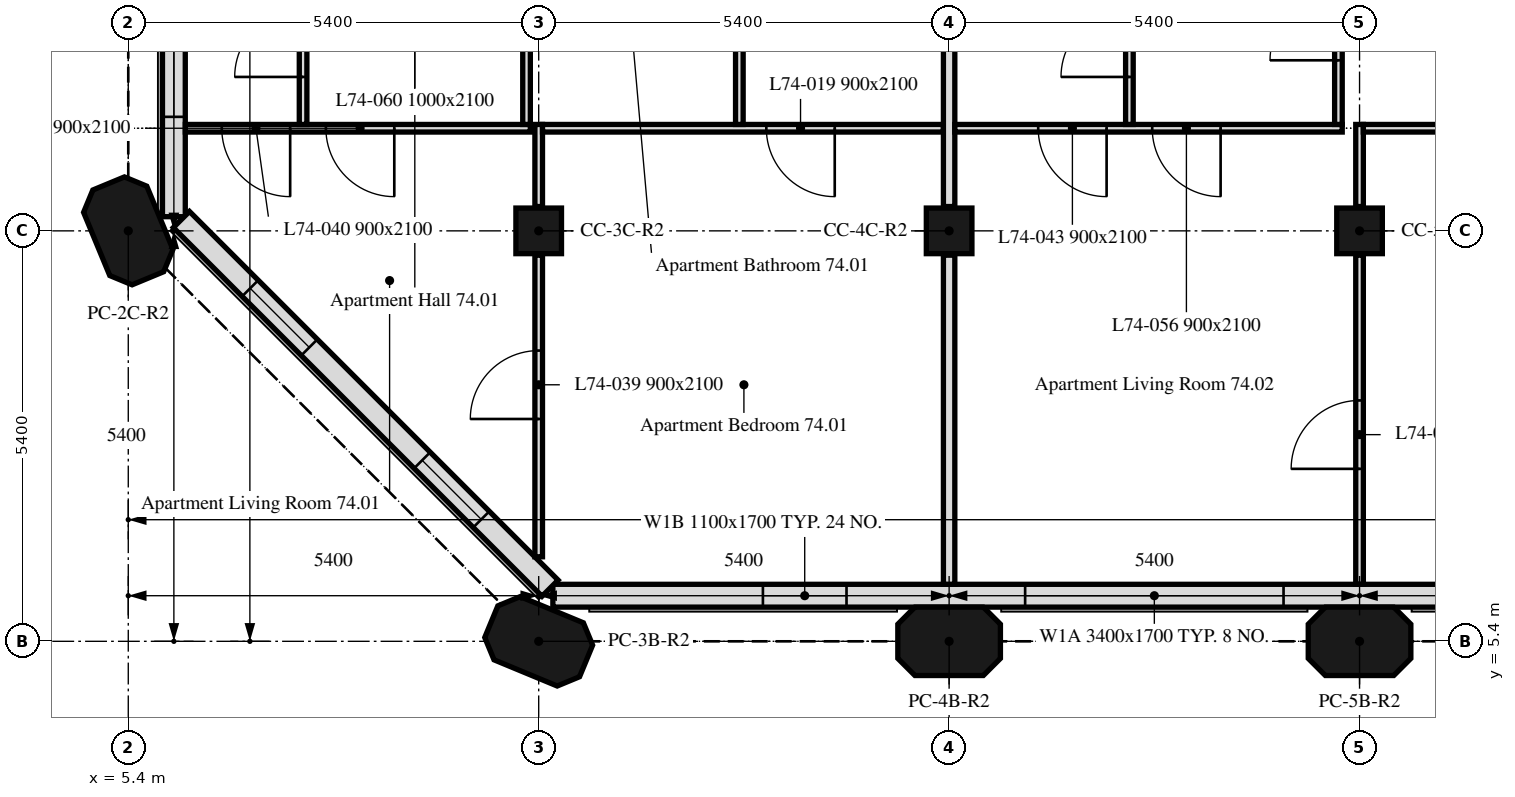
"""IFC4 building model, lengths in metres.
Left out: names, types, materials, properties, quantities, classifications, styles, units other than length and angle.
Written with IfcOpenShell. Run it as: python <this file> out.ifc"""

import sys

from ifc_helpers import new_model, si_unit, direction, frame, frame_2d, origin, origin_2d, place, context, subcontext, project, spatial, polyline, rectangle, outline, extrude, element, fill, save


model = new_model("IFC4")
c1 = context("Model", 3, precision=1e-05, world=origin(), true_north=direction((0.0, 1.0)))
c2 = subcontext(c1, "Body", "Model", "MODEL_VIEW")
j1 = project(units=[si_unit("LENGTHUNIT", "METRE"), si_unit("PLANEANGLEUNIT", "RADIAN")], contexts=[c1])
p1 = place(None, origin())
s1 = spatial("IfcSite", under=j1, at=p1, CompositionType="ELEMENT")
p2 = place(p1, origin())
s2 = spatial("IfcBuilding", under=s1, at=p2, CompositionType="ELEMENT")
p3 = place(p2, frame((0.0, 0.0, 298.3)))
s3 = spatial("IfcBuildingStorey", under=s2, at=p3, CompositionType="ELEMENT", Elevation=298.3)
for number, where, z_axis, x_axis in (
    (1, (10.8, 5.4, 0.0), (0.0, 0.0, 1.0), (-0.924, 0.383, 0.0)),
    (2, (16.2, 5.4, 0.0), (0.0, 0.0, 1.0), (1.0, 0.0, 0.0)),
    (3, (21.6, 5.4, 0.0), (0.0, 0.0, 1.0), (1.0, 0.0, 0.0)),
    (4, (5.4, 10.8, 0.0), (0.0, 0.0, 1.0), (-0.383, 0.924, 0.0)),
):
    element("IfcColumn", number, at=place(p3, frame(where, z_axis=z_axis, x_axis=x_axis)), inside=s3, PredefinedType="COLUMN", context=c2, shape_type="SweptSolid", body=[
        extrude(outline(polyline([(-0.45, -0.45), (0.45, -0.45), (0.675, -0.225), (0.675, 0.225), (0.45, 0.45), (-0.45, 0.45), (-0.675, 0.225), (-0.675, -0.225), (-0.45, -0.45)])), origin(), (0.0, 0.0, 1.0), 3.0),
    ])
for number, where, z_axis, x_axis in (
    (5, (10.8, 10.8, 0.0), (0.0, 0.0, 1.0), (1.0, 0.0, 0.0)),
    (6, (16.2, 10.8, 0.0), (0.0, 0.0, 1.0), (1.0, 0.0, 0.0)),
    (7, (21.6, 10.8, 0.0), (0.0, 0.0, 1.0), (1.0, 0.0, 0.0)),
):
    element("IfcColumn", number, at=place(p3, frame(where, z_axis=z_axis, x_axis=x_axis)), inside=s3, PredefinedType="COLUMN", context=c2, shape_type="SweptSolid", body=[
        extrude(rectangle(XDim=0.6, YDim=0.6, at=origin_2d()), origin(), (0.0, 0.0, 1.0), 3.0),
    ])
p4 = place(p3, frame((10.986, 6.0, 0.0), z_axis=(0.0, 0.0, 1.0), x_axis=(1.0, 0.0, 0.0)))
e8 = element("IfcWall", 8, at=p4, inside=s3, PredefinedType="SOLIDWALL", context=c2, shape_type="SweptSolid", body=[
    extrude(rectangle(XDim=32.027, YDim=0.3, at=frame_2d((16.014, 0.0))), origin(), (0.0, 0.0, 1.0), 3.0),
])
p5 = place(p4, frame((2.764, 0.0, 0.9)))
e9 = element("IfcOpeningElement", 9, at=p5, cuts=e8, PredefinedType="OPENING", context=c2, shape_type="SweptSolid", body=[
    extrude(rectangle(XDim=1.1, YDim=1.7, at=frame_2d((0.55, 0.85))), frame((0.0, 0.16, 0.0), z_axis=(0.0, -1.0, 0.0), x_axis=(1.0, 0.0, 0.0)), (0.0, 0.0, 1.0), 0.32),
])
p6 = place(p4, frame((6.214, 0.0, 0.9)))
e10 = element("IfcOpeningElement", 10, at=p6, cuts=e8, PredefinedType="OPENING", context=c2, shape_type="SweptSolid", body=[
    extrude(rectangle(XDim=3.4, YDim=1.7, at=frame_2d((1.7, 0.85))), frame((0.0, 0.16, 0.0), z_axis=(0.0, -1.0, 0.0), x_axis=(1.0, 0.0, 0.0)), (0.0, 0.0, 1.0), 0.32),
])
p7 = place(p4, frame((13.564, 0.0, 0.9)))
e11 = element("IfcOpeningElement", 11, at=p7, cuts=e8, PredefinedType="OPENING", context=c2, shape_type="SweptSolid", body=[
    extrude(rectangle(XDim=1.1, YDim=1.7, at=frame_2d((0.55, 0.85))), frame((0.0, 0.16, 0.0), z_axis=(0.0, -1.0, 0.0), x_axis=(1.0, 0.0, 0.0)), (0.0, 0.0, 1.0), 0.32),
])
p8 = place(p4, frame((17.014, 0.0, 0.9)))
e12 = element("IfcOpeningElement", 12, at=p8, cuts=e8, PredefinedType="OPENING", context=c2, shape_type="SweptSolid", body=[
    extrude(rectangle(XDim=3.4, YDim=1.7, at=frame_2d((1.7, 0.85))), frame((0.0, 0.16, 0.0), z_axis=(0.0, -1.0, 0.0), x_axis=(1.0, 0.0, 0.0)), (0.0, 0.0, 1.0), 0.32),
])
p9 = place(p4, frame((24.364, 0.0, 0.9)))
e13 = element("IfcOpeningElement", 13, at=p9, cuts=e8, PredefinedType="OPENING", context=c2, shape_type="SweptSolid", body=[
    extrude(rectangle(XDim=1.1, YDim=1.7, at=frame_2d((0.55, 0.85))), frame((0.0, 0.16, 0.0), z_axis=(0.0, -1.0, 0.0), x_axis=(1.0, 0.0, 0.0)), (0.0, 0.0, 1.0), 0.32),
])
p10 = place(p4, frame((27.814, 0.0, 0.9)))
e14 = element("IfcOpeningElement", 14, at=p10, cuts=e8, PredefinedType="OPENING", context=c2, shape_type="SweptSolid", body=[
    extrude(rectangle(XDim=3.4, YDim=1.7, at=frame_2d((1.7, 0.85))), frame((0.0, 0.16, 0.0), z_axis=(0.0, -1.0, 0.0), x_axis=(1.0, 0.0, 0.0)), (0.0, 0.0, 1.0), 0.32),
])
p11 = place(p3, frame((6.0, 16.2, 0.0), z_axis=(0.0, 0.0, 1.0), x_axis=(0.0, -1.0, 0.0)))
e15 = element("IfcWall", 15, at=p11, inside=s3, PredefinedType="SOLIDWALL", context=c2, shape_type="SweptSolid", body=[
    extrude(rectangle(XDim=5.214, YDim=0.3, at=frame_2d((2.607, 0.0))), origin(), (0.0, 0.0, 1.0), 3.0),
])
p12 = place(p11, frame((1.975, 0.0, 0.9)))
e16 = element("IfcOpeningElement", 16, at=p12, cuts=e15, PredefinedType="OPENING", context=c2, shape_type="SweptSolid", body=[
    extrude(rectangle(XDim=0.65, YDim=1.7, at=frame_2d((0.325, 0.85))), frame((0.0, 0.16, 0.0), z_axis=(0.0, -1.0, 0.0), x_axis=(1.0, 0.0, 0.0)), (0.0, 0.0, 1.0), 0.32),
])
p13 = place(p11, frame((2.8, 0.0, 0.9)))
e17 = element("IfcOpeningElement", 17, at=p13, cuts=e15, PredefinedType="OPENING", context=c2, shape_type="SweptSolid", body=[
    extrude(rectangle(XDim=1.1, YDim=1.7, at=frame_2d((0.55, 0.85))), frame((0.0, 0.16, 0.0), z_axis=(0.0, -1.0, 0.0), x_axis=(1.0, 0.0, 0.0)), (0.0, 0.0, 1.0), 0.32),
])
p14 = place(p3, frame((6.099, 10.949, 0.0), z_axis=(0.0, 0.0, 1.0), x_axis=(0.707106781187, -0.707106781187, 0.0)))
e18 = element("IfcWall", 18, at=p14, inside=s3, PredefinedType="SOLIDWALL", context=c2, shape_type="SweptSolid", body=[
    extrude(rectangle(XDim=6.86, YDim=0.3, at=frame_2d((3.43, 0.0))), origin(), (0.0, 0.0, 1.0), 3.0),
])
p15 = place(p14, frame((1.28, 0.0, 0.9)))
e19 = element("IfcOpeningElement", 19, at=p15, cuts=e18, PredefinedType="OPENING", context=c2, shape_type="SweptSolid", body=[
    extrude(rectangle(XDim=1.1, YDim=1.7, at=frame_2d((0.55, 0.85))), frame((0.0, 0.16, 0.0), z_axis=(0.0, -1.0, 0.0), x_axis=(1.0, 0.0, 0.0)), (0.0, 0.0, 1.0), 0.32),
])
p16 = place(p14, frame((4.48, 0.0, 0.9)))
e20 = element("IfcOpeningElement", 20, at=p16, cuts=e18, PredefinedType="OPENING", context=c2, shape_type="SweptSolid", body=[
    extrude(rectangle(XDim=1.1, YDim=1.7, at=frame_2d((0.55, 0.85))), frame((0.0, 0.16, 0.0), z_axis=(0.0, -1.0, 0.0), x_axis=(1.0, 0.0, 0.0)), (0.0, 0.0, 1.0), 0.32),
])
p17 = place(p3, frame((10.8, 6.512, 0.0), z_axis=(0.0, 0.0, 1.0), x_axis=(0.0, 1.0, 0.0)))
e21 = element("IfcWall", 21, at=p17, inside=s3, PredefinedType="PARTITIONING", context=c2, shape_type="SweptSolid", body=[
    extrude(rectangle(XDim=3.968, YDim=0.1, at=frame_2d((1.984, 0.0))), origin(), (0.0, 0.0, 1.0), 3.0),
])
p18 = place(p17, frame((1.813, 0.0, 0.0)))
e22 = element("IfcOpeningElement", 22, at=p18, cuts=e21, PredefinedType="OPENING", context=c2, shape_type="SweptSolid", body=[
    extrude(rectangle(XDim=0.9, YDim=2.1, at=frame_2d((0.45, 1.05))), frame((0.0, 0.05, 0.0), z_axis=(0.0, -1.0, 0.0), x_axis=(1.0, 0.0, 0.0)), (0.0, 0.0, 1.0), 0.1),
])
p19 = place(p3, frame((10.8, 11.12, 0.0), z_axis=(0.0, 0.0, 1.0), x_axis=(0.0, 1.0, 0.0)))
e23 = element("IfcWall", 23, at=p19, inside=s3, PredefinedType="PARTITIONING", context=c2, shape_type="SweptSolid", body=[
    extrude(rectangle(XDim=1.08, YDim=0.1, at=frame_2d((0.54, 0.0))), origin(), (0.0, 0.0, 1.0), 3.0),
])
p20 = place(p3, frame((10.69, 12.15, 0.0), z_axis=(0.0, 0.0, 1.0), x_axis=(-1.0, 0.0, 0.0)))
e24 = element("IfcWall", 24, at=p20, inside=s3, PredefinedType="PARTITIONING", context=c2, shape_type="SweptSolid", body=[
    extrude(rectangle(XDim=4.539, YDim=0.1, at=frame_2d((2.27, 0.0))), origin(), (0.0, 0.0, 1.0), 3.0),
])
p21 = place(p20, frame((3.16, 0.0, 0.0)))
e25 = element("IfcOpeningElement", 25, at=p21, cuts=e24, PredefinedType="OPENING", context=c2, shape_type="SweptSolid", body=[
    extrude(rectangle(XDim=0.9, YDim=2.1, at=frame_2d((0.45, 1.05))), frame((0.0, 0.05, 0.0), z_axis=(0.0, -1.0, 0.0), x_axis=(1.0, 0.0, 0.0)), (0.0, 0.0, 1.0), 0.1),
])
p22 = place(p20, frame((1.79, 0.0, 0.0)))
e26 = element("IfcOpeningElement", 26, at=p22, cuts=e24, PredefinedType="OPENING", context=c2, shape_type="SweptSolid", body=[
    extrude(rectangle(XDim=0.9, YDim=2.1, at=frame_2d((0.45, 1.05))), frame((0.0, 0.05, 0.0), z_axis=(0.0, -1.0, 0.0), x_axis=(1.0, 0.0, 0.0)), (0.0, 0.0, 1.0), 0.1),
])
p23 = place(p3, frame((16.2, 6.151, 0.0), z_axis=(0.0, 0.0, 1.0), x_axis=(0.0, 1.0, 0.0)))
e27 = element("IfcWall", 27, at=p23, inside=s3, PredefinedType="PARTITIONING", context=c2, shape_type="SweptSolid", body=[
    extrude(rectangle(XDim=4.329, YDim=0.15, at=frame_2d((2.165, 0.0))), origin(), (0.0, 0.0, 1.0), 3.0),
])
p24 = place(p3, frame((16.125, 12.15, 0.0), z_axis=(0.0, 0.0, 1.0), x_axis=(-1.0, 0.0, 0.0)))
e28 = element("IfcWall", 28, at=p24, inside=s3, PredefinedType="PARTITIONING", context=c2, shape_type="SweptSolid", body=[
    extrude(rectangle(XDim=5.275, YDim=0.1, at=frame_2d((2.637, 0.0))), origin(), (0.0, 0.0, 1.0), 3.0),
])
p25 = place(p24, frame((1.43, 0.0, 0.0)))
e29 = element("IfcOpeningElement", 29, at=p25, cuts=e28, PredefinedType="OPENING", context=c2, shape_type="SweptSolid", body=[
    extrude(rectangle(XDim=0.9, YDim=2.1, at=frame_2d((0.45, 1.05))), frame((0.0, 0.05, 0.0), z_axis=(0.0, -1.0, 0.0), x_axis=(1.0, 0.0, 0.0)), (0.0, 0.0, 1.0), 0.1),
])
p26 = place(p3, frame((7.7, 12.2, 0.0), z_axis=(0.0, 0.0, 1.0), x_axis=(0.0, 1.0, 0.0)))
e30 = element("IfcWall", 30, at=p26, inside=s3, PredefinedType="PARTITIONING", context=c2, shape_type="SweptSolid", body=[
    extrude(rectangle(XDim=2.125, YDim=0.1, at=frame_2d((1.062, 0.0))), origin(), (0.0, 0.0, 1.0), 3.0),
])
p27 = place(p26, frame((0.625, 0.0, 0.0)))
e31 = element("IfcOpeningElement", 31, at=p27, cuts=e30, PredefinedType="OPENING", context=c2, shape_type="SweptSolid", body=[
    extrude(rectangle(XDim=0.9, YDim=2.1, at=frame_2d((0.45, 1.05))), frame((0.0, 0.05, 0.0), z_axis=(0.0, -1.0, 0.0), x_axis=(1.0, 0.0, 0.0)), (0.0, 0.0, 1.0), 0.1),
])
p28 = place(p3, frame((10.64, 12.2, 0.0), z_axis=(0.0, 0.0, 1.0), x_axis=(0.0, 1.0, 0.0)))
e32 = element("IfcWall", 32, at=p28, inside=s3, PredefinedType="PARTITIONING", context=c2, shape_type="SweptSolid", body=[
    extrude(rectangle(XDim=2.125, YDim=0.1, at=frame_2d((1.062, 0.0))), origin(), (0.0, 0.0, 1.0), 3.0),
])
p29 = place(p28, frame((0.975, 0.0, 0.0)))
e33 = element("IfcOpeningElement", 33, at=p29, cuts=e32, PredefinedType="OPENING", context=c2, shape_type="SweptSolid", body=[
    extrude(rectangle(XDim=0.9, YDim=2.1, at=frame_2d((0.45, 1.05))), frame((0.0, 0.05, 0.0), z_axis=(0.0, -1.0, 0.0), x_axis=(1.0, 0.0, 0.0)), (0.0, 0.0, 1.0), 0.1),
])
p30 = place(p3, frame((13.44, 12.2, 0.0), z_axis=(0.0, 0.0, 1.0), x_axis=(0.0, 1.0, 0.0)))
e34 = element("IfcWall", 34, at=p30, inside=s3, PredefinedType="PARTITIONING", context=c2, shape_type="SweptSolid", body=[
    extrude(rectangle(XDim=2.125, YDim=0.1, at=frame_2d((1.062, 0.0))), origin(), (0.0, 0.0, 1.0), 3.0),
])
p31 = place(p3, frame((16.2, 11.12, 0.0), z_axis=(0.0, 0.0, 1.0), x_axis=(0.0, 1.0, 0.0)))
e35 = element("IfcWall", 35, at=p31, inside=s3, PredefinedType="PARTITIONING", context=c2, shape_type="SweptSolid", body=[
    extrude(rectangle(XDim=3.205, YDim=0.15, at=frame_2d((1.603, 0.0))), origin(), (0.0, 0.0, 1.0), 3.0),
])
p32 = place(p3, frame((21.6, 6.151, 0.0), z_axis=(0.0, 0.0, 1.0), x_axis=(0.0, 1.0, 0.0)))
e36 = element("IfcWall", 36, at=p32, inside=s3, PredefinedType="PARTITIONING", context=c2, shape_type="SweptSolid", body=[
    extrude(rectangle(XDim=4.329, YDim=0.1, at=frame_2d((2.165, 0.0))), origin(), (0.0, 0.0, 1.0), 3.0),
])
p33 = place(p32, frame((1.518, 0.0, 0.0)))
e37 = element("IfcOpeningElement", 37, at=p33, cuts=e36, PredefinedType="OPENING", context=c2, shape_type="SweptSolid", body=[
    extrude(rectangle(XDim=0.9, YDim=2.1, at=frame_2d((0.45, 1.05))), frame((0.0, 0.05, 0.0), z_axis=(0.0, -1.0, 0.0), x_axis=(1.0, 0.0, 0.0)), (0.0, 0.0, 1.0), 0.1),
])
p34 = place(p3, frame((21.6, 11.12, 0.0), z_axis=(0.0, 0.0, 1.0), x_axis=(0.0, 1.0, 0.0)))
e38 = element("IfcWall", 38, at=p34, inside=s3, PredefinedType="PARTITIONING", context=c2, shape_type="SweptSolid", body=[
    extrude(rectangle(XDim=1.08, YDim=0.1, at=frame_2d((0.54, 0.0))), origin(), (0.0, 0.0, 1.0), 3.0),
])
p35 = place(p3, frame((21.372, 12.15, 0.0), z_axis=(0.0, 0.0, 1.0), x_axis=(-1.0, 0.0, 0.0)))
e39 = element("IfcWall", 39, at=p35, inside=s3, PredefinedType="PARTITIONING", context=c2, shape_type="SweptSolid", body=[
    extrude(rectangle(XDim=5.097, YDim=0.1, at=frame_2d((2.549, 0.0))), origin(), (0.0, 0.0, 1.0), 3.0),
])
p36 = place(p35, frame((3.1, 0.0, 0.0)))
e40 = element("IfcOpeningElement", 40, at=p36, cuts=e39, PredefinedType="OPENING", context=c2, shape_type="SweptSolid", body=[
    extrude(rectangle(XDim=0.9, YDim=2.1, at=frame_2d((0.45, 1.05))), frame((0.0, 0.05, 0.0), z_axis=(0.0, -1.0, 0.0), x_axis=(1.0, 0.0, 0.0)), (0.0, 0.0, 1.0), 0.1),
])
p37 = place(p35, frame((1.6, 0.0, 0.0)))
e41 = element("IfcOpeningElement", 41, at=p37, cuts=e39, PredefinedType="OPENING", context=c2, shape_type="SweptSolid", body=[
    extrude(rectangle(XDim=0.9, YDim=2.1, at=frame_2d((0.45, 1.05))), frame((0.0, 0.05, 0.0), z_axis=(0.0, -1.0, 0.0), x_axis=(1.0, 0.0, 0.0)), (0.0, 0.0, 1.0), 0.1),
])
p38 = place(p3, frame((26.925, 12.15, 0.0), z_axis=(0.0, 0.0, 1.0), x_axis=(-1.0, 0.0, 0.0)))
e42 = element("IfcWall", 42, at=p38, inside=s3, PredefinedType="PARTITIONING", context=c2, shape_type="SweptSolid", body=[
    extrude(rectangle(XDim=5.275, YDim=0.1, at=frame_2d((2.638, 0.0))), origin(), (0.0, 0.0, 1.0), 3.0),
])
p39 = place(p38, frame((1.442, 0.0, 0.0)))
e43 = element("IfcOpeningElement", 43, at=p39, cuts=e42, PredefinedType="OPENING", context=c2, shape_type="SweptSolid", body=[
    extrude(rectangle(XDim=0.9, YDim=2.1, at=frame_2d((0.45, 1.05))), frame((0.0, 0.05, 0.0), z_axis=(0.0, -1.0, 0.0), x_axis=(1.0, 0.0, 0.0)), (0.0, 0.0, 1.0), 0.1),
])
p40 = place(p3, frame((18.572, 12.2, 0.0), z_axis=(0.0, 0.0, 1.0), x_axis=(0.0, 1.0, 0.0)))
e44 = element("IfcWall", 44, at=p40, inside=s3, PredefinedType="PARTITIONING", context=c2, shape_type="SweptSolid", body=[
    extrude(rectangle(XDim=2.125, YDim=0.1, at=frame_2d((1.062, 0.0))), origin(), (0.0, 0.0, 1.0), 3.0),
])
p41 = place(p40, frame((0.625, 0.0, 0.0)))
e45 = element("IfcOpeningElement", 45, at=p41, cuts=e44, PredefinedType="OPENING", context=c2, shape_type="SweptSolid", body=[
    extrude(rectangle(XDim=0.9, YDim=2.1, at=frame_2d((0.45, 1.05))), frame((0.0, 0.05, 0.0), z_axis=(0.0, -1.0, 0.0), x_axis=(1.0, 0.0, 0.0)), (0.0, 0.0, 1.0), 0.1),
])
p42 = place(p3, frame((21.322, 12.2, 0.0), z_axis=(0.0, 0.0, 1.0), x_axis=(0.0, 1.0, 0.0)))
e46 = element("IfcWall", 46, at=p42, inside=s3, PredefinedType="PARTITIONING", context=c2, shape_type="SweptSolid", body=[
    extrude(rectangle(XDim=2.125, YDim=0.1, at=frame_2d((1.062, 0.0))), origin(), (0.0, 0.0, 1.0), 3.0),
])
p43 = place(p42, frame((0.844, 0.0, 0.0)))
e47 = element("IfcOpeningElement", 47, at=p43, cuts=e46, PredefinedType="OPENING", context=c2, shape_type="SweptSolid", body=[
    extrude(rectangle(XDim=0.9, YDim=2.1, at=frame_2d((0.45, 1.05))), frame((0.0, 0.05, 0.0), z_axis=(0.0, -1.0, 0.0), x_axis=(1.0, 0.0, 0.0)), (0.0, 0.0, 1.0), 0.1),
])
p44 = place(p5, origin())
e48 = element("IfcWindow", 48, at=p44, inside=s3, PartitioningType="SINGLE_PANEL", PredefinedType="WINDOW", context=c2, shape_type="SweptSolid", body=[
    extrude(rectangle(XDim=1.1, YDim=1.7, at=frame_2d((0.55, 0.85))), frame((0.0, 0.03, 0.0), z_axis=(0.0, -1.0, 0.0), x_axis=(1.0, 0.0, 0.0)), (0.0, 0.0, 1.0), 0.06),
])
fill(e9, e48)
p45 = place(p6, origin())
e49 = element("IfcWindow", 49, at=p45, inside=s3, PartitioningType="SINGLE_PANEL", PredefinedType="WINDOW", context=c2, shape_type="SweptSolid", body=[
    extrude(rectangle(XDim=3.4, YDim=1.7, at=frame_2d((1.7, 0.85))), frame((0.0, 0.03, 0.0), z_axis=(0.0, -1.0, 0.0), x_axis=(1.0, 0.0, 0.0)), (0.0, 0.0, 1.0), 0.06),
])
fill(e10, e49)
p46 = place(p13, origin())
e50 = element("IfcWindow", 50, at=p46, inside=s3, PartitioningType="SINGLE_PANEL", PredefinedType="WINDOW", context=c2, shape_type="SweptSolid", body=[
    extrude(rectangle(XDim=1.1, YDim=1.7, at=frame_2d((0.55, 0.85))), frame((0.0, 0.03, 0.0), z_axis=(0.0, -1.0, 0.0), x_axis=(1.0, 0.0, 0.0)), (0.0, 0.0, 1.0), 0.06),
])
fill(e17, e50)
p47 = place(p15, origin())
e51 = element("IfcWindow", 51, at=p47, inside=s3, PartitioningType="SINGLE_PANEL", PredefinedType="WINDOW", context=c2, shape_type="SweptSolid", body=[
    extrude(rectangle(XDim=1.1, YDim=1.7, at=frame_2d((0.55, 0.85))), frame((0.0, 0.03, 0.0), z_axis=(0.0, -1.0, 0.0), x_axis=(1.0, 0.0, 0.0)), (0.0, 0.0, 1.0), 0.06),
])
fill(e19, e51)
p48 = place(p16, origin())
e52 = element("IfcWindow", 52, at=p48, inside=s3, PartitioningType="SINGLE_PANEL", PredefinedType="WINDOW", context=c2, shape_type="SweptSolid", body=[
    extrude(rectangle(XDim=1.1, YDim=1.7, at=frame_2d((0.55, 0.85))), frame((0.0, 0.03, 0.0), z_axis=(0.0, -1.0, 0.0), x_axis=(1.0, 0.0, 0.0)), (0.0, 0.0, 1.0), 0.06),
])
fill(e20, e52)
p49 = place(p25, origin())
e53 = element("IfcDoor", 53, at=p49, inside=s3, OperationType="SINGLE_SWING_LEFT", PredefinedType="DOOR", context=c2, shape_type="SweptSolid", body=[
    extrude(rectangle(XDim=0.9, YDim=2.1, at=frame_2d((0.45, 1.05))), frame((0.0, 0.025, 0.0), z_axis=(0.0, -1.0, 0.0), x_axis=(1.0, 0.0, 0.0)), (0.0, 0.0, 1.0), 0.05),
])
fill(e29, e53)
p50 = place(p43, origin())
e54 = element("IfcDoor", 54, at=p50, inside=s3, OperationType="SINGLE_SWING_LEFT", PredefinedType="DOOR", context=c2, shape_type="SweptSolid", body=[
    extrude(rectangle(XDim=0.9, YDim=2.1, at=frame_2d((0.45, 1.05))), frame((0.0, 0.025, 0.0), z_axis=(0.0, -1.0, 0.0), x_axis=(1.0, 0.0, 0.0)), (0.0, 0.0, 1.0), 0.05),
])
fill(e47, e54)
p51 = place(p18, origin())
e55 = element("IfcDoor", 55, at=p51, inside=s3, OperationType="SINGLE_SWING_RIGHT", PredefinedType="DOOR", context=c2, shape_type="SweptSolid", body=[
    extrude(rectangle(XDim=0.9, YDim=2.1, at=frame_2d((0.45, 1.05))), frame((0.0, 0.025, 0.0), z_axis=(0.0, -1.0, 0.0), x_axis=(1.0, 0.0, 0.0)), (0.0, 0.0, 1.0), 0.05),
])
fill(e22, e55)
p52 = place(p21, origin())
e56 = element("IfcDoor", 56, at=p52, inside=s3, OperationType="SINGLE_SWING_RIGHT", PredefinedType="DOOR", context=c2, shape_type="SweptSolid", body=[
    extrude(rectangle(XDim=0.9, YDim=2.1, at=frame_2d((0.45, 1.05))), frame((0.0, 0.025, 0.0), z_axis=(0.0, -1.0, 0.0), x_axis=(1.0, 0.0, 0.0)), (0.0, 0.0, 1.0), 0.05),
])
fill(e25, e56)
p53 = place(p27, origin())
e57 = element("IfcDoor", 57, at=p53, inside=s3, OperationType="SINGLE_SWING_RIGHT", PredefinedType="DOOR", context=c2, shape_type="SweptSolid", body=[
    extrude(rectangle(XDim=0.9, YDim=2.1, at=frame_2d((0.45, 1.05))), frame((0.0, 0.025, 0.0), z_axis=(0.0, -1.0, 0.0), x_axis=(1.0, 0.0, 0.0)), (0.0, 0.0, 1.0), 0.05),
])
fill(e31, e57)
p54 = place(p33, origin())
e58 = element("IfcDoor", 58, at=p54, inside=s3, OperationType="SINGLE_SWING_RIGHT", PredefinedType="DOOR", context=c2, shape_type="SweptSolid", body=[
    extrude(rectangle(XDim=0.9, YDim=2.1, at=frame_2d((0.45, 1.05))), frame((0.0, 0.025, 0.0), z_axis=(0.0, -1.0, 0.0), x_axis=(1.0, 0.0, 0.0)), (0.0, 0.0, 1.0), 0.05),
])
fill(e37, e58)
p55 = place(p36, origin())
e59 = element("IfcDoor", 59, at=p55, inside=s3, OperationType="SINGLE_SWING_RIGHT", PredefinedType="DOOR", context=c2, shape_type="SweptSolid", body=[
    extrude(rectangle(XDim=0.9, YDim=2.1, at=frame_2d((0.45, 1.05))), frame((0.0, 0.025, 0.0), z_axis=(0.0, -1.0, 0.0), x_axis=(1.0, 0.0, 0.0)), (0.0, 0.0, 1.0), 0.05),
])
fill(e40, e59)
p56 = place(p41, origin())
e60 = element("IfcDoor", 60, at=p56, inside=s3, OperationType="SINGLE_SWING_LEFT", PredefinedType="DOOR", context=c2, shape_type="SweptSolid", body=[
    extrude(rectangle(XDim=0.9, YDim=2.1, at=frame_2d((0.45, 1.05))), frame((0.0, 0.025, 0.0), z_axis=(0.0, -1.0, 0.0), x_axis=(1.0, 0.0, 0.0)), (0.0, 0.0, 1.0), 0.05),
])
fill(e45, e60)
p57 = place(p22, origin())
e61 = element("IfcDoor", 61, at=p57, inside=s3, OperationType="SINGLE_SWING_LEFT", PredefinedType="DOOR", context=c2, shape_type="SweptSolid", body=[
    extrude(rectangle(XDim=0.9, YDim=2.1, at=frame_2d((0.45, 1.05))), frame((0.0, 0.025, 0.0), z_axis=(0.0, -1.0, 0.0), x_axis=(1.0, 0.0, 0.0)), (0.0, 0.0, 1.0), 0.05),
])
fill(e26, e61)
p58 = place(p37, origin())
e62 = element("IfcDoor", 62, at=p58, inside=s3, OperationType="SINGLE_SWING_LEFT", PredefinedType="DOOR", context=c2, shape_type="SweptSolid", body=[
    extrude(rectangle(XDim=0.9, YDim=2.1, at=frame_2d((0.45, 1.05))), frame((0.0, 0.025, 0.0), z_axis=(0.0, -1.0, 0.0), x_axis=(1.0, 0.0, 0.0)), (0.0, 0.0, 1.0), 0.05),
])
fill(e41, e62)
save(model, sys.argv[1])
